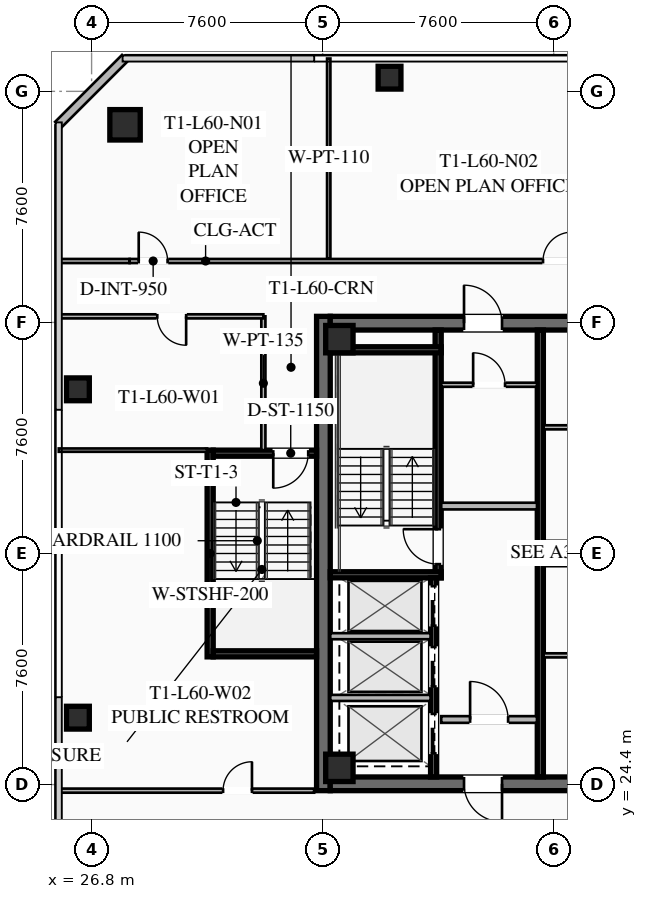
"""IFC4 building model, lengths in metres.
Left out: names, types, materials, properties, quantities, classifications, styles, units other than length and angle.
Written with IfcOpenShell. Run it as: python <this file> out.ifc"""

import sys

from ifc_helpers import new_model, si_unit, direction, frame, frame_2d, origin, origin_2d, place, context, subcontext, project, spatial, rectangle, hollow_rectangle, extrude, element, fill, save


model = new_model("IFC4")
c1 = context("Model", 3, precision=1e-05, world=origin(), true_north=direction((0.0, 1.0)))
c2 = subcontext(c1, "Body", "Model", "MODEL_VIEW")
j1 = project(units=[si_unit("LENGTHUNIT", "METRE"), si_unit("PLANEANGLEUNIT", "RADIAN")], contexts=[c1])
p1 = place(None, origin())
s1 = spatial("IfcSite", under=j1, at=p1, CompositionType="ELEMENT")
p2 = place(p1, origin())
s2 = spatial("IfcBuilding", under=s1, at=p2, CompositionType="ELEMENT")
p3 = place(p2, frame((0.0, 0.0, 221.95)))
s3 = spatial("IfcBuildingStorey", under=s2, at=p3, CompositionType="ELEMENT", Elevation=221.95)
p4 = place(p3, frame((34.425, 24.2, 0.0), z_axis=(0.0, 0.0, 1.0), x_axis=(0.0, 1.0, 0.0)))
e1 = element("IfcWall", 1, at=p4, inside=s3, PredefinedType="SHEAR", context=c2, shape_type="SweptSolid", body=[
    extrude(rectangle(XDim=15.6, YDim=0.45, at=frame_2d((7.8, 0.0))), origin(), (0.0, 0.0, 1.0), 3.55),
])
p5 = place(p3, frame((49.35, 24.425, 0.0), z_axis=(0.0, 0.0, 1.0), x_axis=(-1.0, 0.0, 0.0)))
e2 = element("IfcWall", 2, at=p5, inside=s3, PredefinedType="SHEAR", context=c2, shape_type="SweptSolid", body=[
    extrude(rectangle(XDim=14.7, YDim=0.45, at=frame_2d((7.35, 0.0))), origin(), (0.0, 0.0, 1.0), 3.55),
])
p6 = place(p5, frame((9.05, 0.0, 0.0)))
e3 = element("IfcOpeningElement", 3, at=p6, cuts=e2, PredefinedType="OPENING", context=c2, shape_type="SweptSolid", body=[
    extrude(rectangle(XDim=1.25, YDim=2.25, at=frame_2d((0.625, 1.125))), frame((0.0, 0.235, 0.0), z_axis=(0.0, -1.0, 0.0), x_axis=(1.0, 0.0, 0.0)), (0.0, 0.0, 1.0), 0.47),
])
p7 = place(p5, frame((4.0, 0.0, 0.0)))
e4 = element("IfcOpeningElement", 4, at=p7, cuts=e2, PredefinedType="OPENING", context=c2, shape_type="SweptSolid", body=[
    extrude(rectangle(XDim=1.25, YDim=2.25, at=frame_2d((0.625, 1.125))), frame((0.0, 0.235, 0.0), z_axis=(0.0, -1.0, 0.0), x_axis=(1.0, 0.0, 0.0)), (0.0, 0.0, 1.0), 0.47),
])
p8 = place(p3, frame((34.65, 39.575, 0.0), z_axis=(0.0, 0.0, 1.0), x_axis=(1.0, 0.0, 0.0)))
e5 = element("IfcWall", 5, at=p8, inside=s3, PredefinedType="SHEAR", context=c2, shape_type="SweptSolid", body=[
    extrude(rectangle(XDim=14.7, YDim=0.45, at=frame_2d((7.35, 0.0))), origin(), (0.0, 0.0, 1.0), 3.55),
])
p9 = place(p8, frame((4.4, 0.0, 0.0)))
e6 = element("IfcOpeningElement", 6, at=p9, cuts=e5, PredefinedType="OPENING", context=c2, shape_type="SweptSolid", body=[
    extrude(rectangle(XDim=1.25, YDim=2.25, at=frame_2d((0.625, 1.125))), frame((0.0, 0.235, 0.0), z_axis=(0.0, -1.0, 0.0), x_axis=(1.0, 0.0, 0.0)), (0.0, 0.0, 1.0), 0.47),
])
p10 = place(p8, frame((9.45, 0.0, 0.0)))
e7 = element("IfcOpeningElement", 7, at=p10, cuts=e5, PredefinedType="OPENING", context=c2, shape_type="SweptSolid", body=[
    extrude(rectangle(XDim=1.25, YDim=2.25, at=frame_2d((0.625, 1.125))), frame((0.0, 0.235, 0.0), z_axis=(0.0, -1.0, 0.0), x_axis=(1.0, 0.0, 0.0)), (0.0, 0.0, 1.0), 0.47),
])
for number, where, z_axis, x_axis in (
    (8, (34.95, 24.95, 0.0), (0.0, 0.0, 1.0), (1.0, 0.0, 0.0)),
    (9, (34.95, 39.05, 0.0), (0.0, 0.0, 1.0), (1.0, 0.0, 0.0)),
):
    element("IfcColumn", number, at=place(p3, frame(where, z_axis=z_axis, x_axis=x_axis)), inside=s3, PredefinedType="COLUMN", context=c2, shape_type="SweptSolid", body=[
        extrude(hollow_rectangle(XDim=0.9, YDim=0.9, WallThickness=0.04, at=origin_2d()), origin(), (0.0, 0.0, 1.0), 3.37),
    ])
p11 = place(p3, frame((27.9, 46.1, 0.0), z_axis=(0.0, 0.0, 1.0), x_axis=(1.0, 0.0, 0.0)))
e10 = element("IfcColumn", 10, at=p11, inside=s3, PredefinedType="COLUMN", context=c2, shape_type="SweptSolid", body=[
    extrude(hollow_rectangle(XDim=1.0, YDim=1.0, WallThickness=0.04, at=origin_2d()), origin(), (0.0, 0.0, 1.0), 3.37),
])
for number, where, z_axis, x_axis in (
    (11, (36.6, 47.65, 0.0), (0.0, 0.0, 1.0), (1.0, 0.0, 0.0)),
    (12, (26.35, 37.4, 0.0), (0.0, 0.0, 1.0), (1.0, 0.0, 0.0)),
    (13, (26.35, 26.6, 0.0), (0.0, 0.0, 1.0), (1.0, 0.0, 0.0)),
):
    element("IfcColumn", number, at=place(p3, frame(where, z_axis=z_axis, x_axis=x_axis)), inside=s3, PredefinedType="COLUMN", context=c2, shape_type="SweptSolid", body=[
        extrude(hollow_rectangle(XDim=0.75, YDim=0.75, WallThickness=0.032, at=origin_2d()), origin(), (0.0, 0.0, 1.0), 3.37),
    ])
p12 = place(p3, frame((25.7, 46.1, 0.0), z_axis=(0.0, 0.0, 1.0), x_axis=(0.707106781187, 0.707106781187, 0.0)))
e14 = element("IfcWall", 14, at=p12, inside=s3, PredefinedType="SOLIDWALL", context=c2, shape_type="SweptSolid", body=[
    extrude(rectangle(XDim=3.111, YDim=0.28, at=frame_2d((1.556, 0.0))), origin(), (0.0, 0.0, 1.0), 3.37),
])
p13 = place(p3, frame((38.2, 31.2, 0.0), z_axis=(0.0, 0.0, 1.0), x_axis=(0.0, 1.0, 0.0)))
e15 = element("IfcWall", 15, at=p13, inside=s3, PredefinedType="SHEAR", context=c2, shape_type="SweptSolid", body=[
    extrude(rectangle(XDim=8.15, YDim=0.2, at=frame_2d((4.075, 0.0))), origin(), (0.0, 0.0, 1.0), 3.37),
])
p14 = place(p13, frame((0.45, 0.0, 0.0)))
e16 = element("IfcOpeningElement", 16, at=p14, cuts=e15, PredefinedType="OPENING", context=c2, shape_type="SweptSolid", body=[
    extrude(rectangle(XDim=1.15, YDim=2.2, at=frame_2d((0.575, 1.1))), frame((0.0, 0.11, 0.0), z_axis=(0.0, -1.0, 0.0), x_axis=(1.0, 0.0, 0.0)), (0.0, 0.0, 1.0), 0.22),
])
for number, where, z_axis, x_axis in (
    (17, (34.65, 31.3, 0.0), (0.0, 0.0, 1.0), (1.0, 0.0, 0.0)),
    (18, (34.65, 38.7, 0.0), (0.0, 0.0, 1.0), (1.0, 0.0, 0.0)),
):
    element("IfcWall", number, at=place(p3, frame(where, z_axis=z_axis, x_axis=x_axis)), inside=s3, PredefinedType="SHEAR", context=c2, shape_type="SweptSolid", body=[
        extrude(rectangle(XDim=3.65, YDim=0.2, at=frame_2d((1.825, 0.0))), origin(), (0.0, 0.0, 1.0), 3.37),
    ])
p15 = place(p3, frame((41.56, 24.65, 0.0), z_axis=(0.0, 0.0, 1.0), x_axis=(0.0, 1.0, 0.0)))
e19 = element("IfcWall", 19, at=p15, inside=s3, PredefinedType="SHEAR", context=c2, shape_type="SweptSolid", body=[
    extrude(rectangle(XDim=14.7, YDim=0.2, at=frame_2d((7.35, 0.0))), origin(), (0.0, 0.0, 1.0), 3.37),
])
p16 = place(p3, frame((38.3, 33.56, 0.0), z_axis=(0.0, 0.0, 1.0), x_axis=(1.0, 0.0, 0.0)))
e20 = element("IfcWall", 20, at=p16, inside=s3, PredefinedType="SOLIDWALL", context=c2, shape_type="SweptSolid", body=[
    extrude(rectangle(XDim=3.15, YDim=0.22, at=frame_2d((1.575, 0.0))), origin(), (0.0, 0.0, 1.0), 2.723),
])
p17 = place(p3, frame((38.3, 26.54, 0.0), z_axis=(0.0, 0.0, 1.0), x_axis=(1.0, 0.0, 0.0)))
e21 = element("IfcWall", 21, at=p17, inside=s3, PredefinedType="SOLIDWALL", context=c2, shape_type="SweptSolid", body=[
    extrude(rectangle(XDim=3.15, YDim=0.22, at=frame_2d((1.575, 0.0))), origin(), (0.0, 0.0, 1.0), 2.723),
])
p18 = place(p17, frame((0.95, 0.0, 0.0)))
e22 = element("IfcOpeningElement", 22, at=p18, cuts=e21, PredefinedType="OPENING", context=c2, shape_type="SweptSolid", body=[
    extrude(rectangle(XDim=1.25, YDim=2.25, at=frame_2d((0.625, 1.125))), frame((0.0, 0.12, 0.0), z_axis=(0.0, -1.0, 0.0), x_axis=(1.0, 0.0, 0.0)), (0.0, 0.0, 1.0), 0.24),
])
p19 = place(p3, frame((38.05, 24.65, 0.0), z_axis=(0.0, 0.0, 1.0), x_axis=(0.0, 1.0, 0.0)))
e23 = element("IfcWall", 23, at=p19, inside=s3, PredefinedType="SHEAR", context=c2, shape_type="SweptSolid", body=[
    extrude(rectangle(XDim=6.55, YDim=0.2, at=frame_2d((3.275, 0.0))), origin(), (0.0, 0.0, 1.0), 3.37),
])
p20 = place(p19, frame((4.975, 0.0, 0.0)))
e24 = element("IfcOpeningElement", 24, at=p20, cuts=e23, PredefinedType="OPENING", context=c2, shape_type="SweptSolid", body=[
    extrude(rectangle(XDim=1.3, YDim=2.25, at=frame_2d((0.65, 1.125))), frame((0.0, 0.11, 0.0), z_axis=(0.0, -1.0, 0.0), x_axis=(1.0, 0.0, 0.0)), (0.0, 0.0, 1.0), 0.22),
])
p21 = place(p19, frame((2.975, 0.0, 0.0)))
e25 = element("IfcOpeningElement", 25, at=p21, cuts=e23, PredefinedType="OPENING", context=c2, shape_type="SweptSolid", body=[
    extrude(rectangle(XDim=1.3, YDim=2.25, at=frame_2d((0.65, 1.125))), frame((0.0, 0.11, 0.0), z_axis=(0.0, -1.0, 0.0), x_axis=(1.0, 0.0, 0.0)), (0.0, 0.0, 1.0), 0.22),
])
p22 = place(p19, frame((0.775, 0.0, 0.0)))
e26 = element("IfcOpeningElement", 26, at=p22, cuts=e23, PredefinedType="OPENING", context=c2, shape_type="SweptSolid", body=[
    extrude(rectangle(XDim=1.3, YDim=2.25, at=frame_2d((0.65, 1.125))), frame((0.0, 0.11, 0.0), z_axis=(0.0, -1.0, 0.0), x_axis=(1.0, 0.0, 0.0)), (0.0, 0.0, 1.0), 0.22),
])
for number, where, z_axis, x_axis in (
    (27, (34.65, 27.25, 0.0), (0.0, 0.0, 1.0), (1.0, 0.0, 0.0)),
    (28, (34.65, 29.28, 0.0), (0.0, 0.0, 1.0), (1.0, 0.0, 0.0)),
):
    element("IfcWall", number, at=place(p3, frame(where, z_axis=z_axis, x_axis=x_axis)), inside=s3, PredefinedType="SOLIDWALL", context=c2, shape_type="SweptSolid", body=[
        extrude(rectangle(XDim=3.3, YDim=0.2, at=frame_2d((1.65, 0.0))), origin(), (0.0, 0.0, 1.0), 3.37),
    ])
p23 = place(p3, frame((38.3, 37.55, 0.0), z_axis=(0.0, 0.0, 1.0), x_axis=(1.0, 0.0, 0.0)))
e29 = element("IfcWall", 29, at=p23, inside=s3, PredefinedType="PARTITIONING", context=c2, shape_type="SweptSolid", body=[
    extrude(rectangle(XDim=3.15, YDim=0.135, at=frame_2d((1.575, 0.0))), origin(), (0.0, 0.0, 1.0), 2.723),
])
p24 = place(p23, frame((1.05, 0.0, 0.0)))
e30 = element("IfcOpeningElement", 30, at=p24, cuts=e29, PredefinedType="OPENING", context=c2, shape_type="SweptSolid", body=[
    extrude(rectangle(XDim=1.05, YDim=2.2, at=frame_2d((0.525, 1.1))), frame((0.0, 0.077, 0.0), z_axis=(0.0, -1.0, 0.0), x_axis=(1.0, 0.0, 0.0)), (0.0, 0.0, 1.0), 0.155),
])
for number, where, z_axis, x_axis in (
    (31, (41.67, 31.65, 0.0), (0.0, 0.0, 1.0), (1.0, 0.0, 0.0)),
    (32, (41.67, 28.65, 0.0), (0.0, 0.0, 1.0), (1.0, 0.0, 0.0)),
    (33, (41.67, 32.35, 0.0), (0.0, 0.0, 1.0), (1.0, 0.0, 0.0)),
    (34, (41.67, 36.15, 0.0), (0.0, 0.0, 1.0), (1.0, 0.0, 0.0)),
):
    element("IfcWall", number, at=place(p3, frame(where, z_axis=z_axis, x_axis=x_axis)), inside=s3, PredefinedType="PARTITIONING", context=c2, shape_type="SweptSolid", body=[
        extrude(rectangle(XDim=1.88, YDim=0.135, at=frame_2d((0.94, 0.0))), origin(), (0.0, 0.0, 1.0), 2.723),
    ])
p25 = place(p3, frame((30.7, 28.6, 0.0), z_axis=(0.0, 0.0, 1.0), x_axis=(0.0, 1.0, 0.0)))
e35 = element("IfcWall", 35, at=p25, inside=s3, PredefinedType="SHEAR", context=c2, shape_type="SweptSolid", body=[
    extrude(rectangle(XDim=6.8, YDim=0.2, at=frame_2d((3.4, 0.0))), origin(), (0.0, 0.0, 1.0), 3.37),
])
p26 = place(p3, frame((34.2, 35.3, 0.0), z_axis=(0.0, 0.0, 1.0), x_axis=(-1.0, 0.0, 0.0)))
e36 = element("IfcWall", 36, at=p26, inside=s3, PredefinedType="SHEAR", context=c2, shape_type="SweptSolid", body=[
    extrude(rectangle(XDim=3.4, YDim=0.2, at=frame_2d((1.7, 0.0))), origin(), (0.0, 0.0, 1.0), 3.37),
])
p27 = place(p26, frame((0.275, 0.0, 0.0)))
e37 = element("IfcOpeningElement", 37, at=p27, cuts=e36, PredefinedType="OPENING", context=c2, shape_type="SweptSolid", body=[
    extrude(rectangle(XDim=1.15, YDim=2.2, at=frame_2d((0.575, 1.1))), frame((0.0, 0.11, 0.0), z_axis=(0.0, -1.0, 0.0), x_axis=(1.0, 0.0, 0.0)), (0.0, 0.0, 1.0), 0.22),
])
p28 = place(p3, frame((30.8, 28.7, 0.0), z_axis=(0.0, 0.0, 1.0), x_axis=(1.0, 0.0, 0.0)))
e38 = element("IfcWall", 38, at=p28, inside=s3, PredefinedType="SHEAR", context=c2, shape_type="SweptSolid", body=[
    extrude(rectangle(XDim=3.4, YDim=0.2, at=frame_2d((1.7, 0.0))), origin(), (0.0, 0.0, 1.0), 3.37),
])
p29 = place(p3, frame((32.45, 35.4, 0.0), z_axis=(0.0, 0.0, 1.0), x_axis=(0.0, 1.0, 0.0)))
e39 = element("IfcWall", 39, at=p29, inside=s3, PredefinedType="PARTITIONING", context=c2, shape_type="SweptSolid", body=[
    extrude(rectangle(XDim=4.4, YDim=0.135, at=frame_2d((2.2, 0.0))), origin(), (0.0, 0.0, 1.0), 2.723),
])
p30 = place(p3, frame((28.05, 41.62, 0.0), z_axis=(0.0, 0.0, 1.0), x_axis=(1.0, 0.0, 0.0)))
e40 = element("IfcWall", 40, at=p30, inside=s3, PredefinedType="PARTITIONING", context=c2, shape_type="SweptSolid", body=[
    extrude(rectangle(XDim=27.9, YDim=0.135, at=frame_2d((13.95, 0.0))), origin(), (0.0, 0.0, 1.0), 2.723),
])
p31 = place(p30, frame((0.3, 0.0, 0.0)))
e41 = element("IfcOpeningElement", 41, at=p31, cuts=e40, PredefinedType="OPENING", context=c2, shape_type="SweptSolid", body=[
    extrude(rectangle(XDim=0.95, YDim=2.05, at=frame_2d((0.475, 1.025))), frame((0.0, 0.077, 0.0), z_axis=(0.0, -1.0, 0.0), x_axis=(1.0, 0.0, 0.0)), (0.0, 0.0, 1.0), 0.155),
])
p32 = place(p30, frame((13.599, 0.0, 0.0)))
e42 = element("IfcOpeningElement", 42, at=p32, cuts=e40, PredefinedType="OPENING", context=c2, shape_type="SweptSolid", body=[
    extrude(rectangle(XDim=0.95, YDim=2.05, at=frame_2d((0.475, 1.025))), frame((0.0, 0.077, 0.0), z_axis=(0.0, -1.0, 0.0), x_axis=(1.0, 0.0, 0.0)), (0.0, 0.0, 1.0), 0.155),
])
p33 = place(p30, frame((26.65, 0.0, 0.0)))
e43 = element("IfcOpeningElement", 43, at=p33, cuts=e40, PredefinedType="OPENING", context=c2, shape_type="SweptSolid", body=[
    extrude(rectangle(XDim=0.95, YDim=2.05, at=frame_2d((0.475, 1.025))), frame((0.0, 0.077, 0.0), z_axis=(0.0, -1.0, 0.0), x_axis=(1.0, 0.0, 0.0)), (0.0, 0.0, 1.0), 0.155),
])
p34 = place(p3, frame((25.72, 41.62, 0.0), z_axis=(0.0, 0.0, 1.0), x_axis=(1.0, 0.0, 0.0)))
e44 = element("IfcWall", 44, at=p34, inside=s3, PredefinedType="PARTITIONING", context=c2, shape_type="SweptSolid", body=[
    extrude(rectangle(XDim=2.33, YDim=0.135, at=frame_2d((1.165, 0.0))), origin(), (0.0, 0.0, 1.0), 2.723),
])
p35 = place(p3, frame((34.6, 41.7, 0.0), z_axis=(0.0, 0.0, 1.0), x_axis=(0.0, 1.0, 0.0)))
e45 = element("IfcWall", 45, at=p35, inside=s3, PredefinedType="PARTITIONING", context=c2, shape_type="SweptSolid", body=[
    extrude(rectangle(XDim=6.58, YDim=0.11, at=frame_2d((3.29, 0.0))), origin(), (0.0, 0.0, 1.0), 2.723),
])
p36 = place(p3, frame((32.45, 39.8, 0.0), z_axis=(0.0, 0.0, 1.0), x_axis=(-1.0, 0.0, 0.0)))
e46 = element("IfcWall", 46, at=p36, inside=s3, PredefinedType="PARTITIONING", context=c2, shape_type="SweptSolid", body=[
    extrude(rectangle(XDim=6.73, YDim=0.135, at=frame_2d((3.365, 0.0))), origin(), (0.0, 0.0, 1.0), 2.723),
])
p37 = place(p36, frame((2.54, 0.0, 0.0)))
e47 = element("IfcOpeningElement", 47, at=p37, cuts=e46, PredefinedType="OPENING", context=c2, shape_type="SweptSolid", body=[
    extrude(rectangle(XDim=0.95, YDim=2.05, at=frame_2d((0.475, 1.025))), frame((0.0, 0.077, 0.0), z_axis=(0.0, -1.0, 0.0), x_axis=(1.0, 0.0, 0.0)), (0.0, 0.0, 1.0), 0.155),
])
p38 = place(p3, frame((25.72, 24.2, 0.0), z_axis=(0.0, 0.0, 1.0), x_axis=(1.0, 0.0, 0.0)))
e48 = element("IfcWall", 48, at=p38, inside=s3, PredefinedType="PARTITIONING", context=c2, shape_type="SweptSolid", body=[
    extrude(rectangle(XDim=8.4, YDim=0.135, at=frame_2d((4.2, 0.0))), origin(), (0.0, 0.0, 1.0), 2.723),
])
p39 = place(p38, frame((5.405, 0.0, 0.0)))
e49 = element("IfcOpeningElement", 49, at=p39, cuts=e48, PredefinedType="OPENING", context=c2, shape_type="SweptSolid", body=[
    extrude(rectangle(XDim=0.95, YDim=2.05, at=frame_2d((0.475, 1.025))), frame((0.0, 0.077, 0.0), z_axis=(0.0, -1.0, 0.0), x_axis=(1.0, 0.0, 0.0)), (0.0, 0.0, 1.0), 0.155),
])
p40 = place(p3, frame((30.6, 35.4, 0.0), z_axis=(0.0, 0.0, 1.0), x_axis=(-1.0, 0.0, 0.0)))
e50 = element("IfcWall", 50, at=p40, inside=s3, PredefinedType="PARTITIONING", context=c2, shape_type="SweptSolid", body=[
    extrude(rectangle(XDim=4.88, YDim=0.11, at=frame_2d((2.44, 0.0))), origin(), (0.0, 0.0, 1.0), 2.723),
])
p41 = place(p9, origin())
e51 = element("IfcDoor", 51, at=p41, inside=s3, OperationType="SINGLE_SWING_LEFT", PredefinedType="DOOR", context=c2, shape_type="SweptSolid", body=[
    extrude(rectangle(XDim=1.25, YDim=2.25, at=frame_2d((0.625, 1.125))), frame((0.0, 0.025, 0.0), z_axis=(0.0, -1.0, 0.0), x_axis=(1.0, 0.0, 0.0)), (0.0, 0.0, 1.0), 0.05),
])
fill(e6, e51)
p42 = place(p6, origin())
e52 = element("IfcDoor", 52, at=p42, inside=s3, OperationType="SINGLE_SWING_LEFT", PredefinedType="DOOR", context=c2, shape_type="SweptSolid", body=[
    extrude(rectangle(XDim=1.25, YDim=2.25, at=frame_2d((0.625, 1.125))), frame((0.0, 0.025, 0.0), z_axis=(0.0, -1.0, 0.0), x_axis=(1.0, 0.0, 0.0)), (0.0, 0.0, 1.0), 0.05),
])
fill(e3, e52)
p43 = place(p14, origin())
e53 = element("IfcDoor", 53, at=p43, inside=s3, OperationType="SINGLE_SWING_RIGHT", PredefinedType="DOOR", context=c2, shape_type="SweptSolid", body=[
    extrude(rectangle(XDim=1.15, YDim=2.2, at=frame_2d((0.575, 1.1))), frame((0.0, 0.025, 0.0), z_axis=(0.0, -1.0, 0.0), x_axis=(1.0, 0.0, 0.0)), (0.0, 0.0, 1.0), 0.05),
])
fill(e16, e53)
p44 = place(p18, origin())
e54 = element("IfcDoor", 54, at=p44, inside=s3, OperationType="SINGLE_SWING_LEFT", PredefinedType="DOOR", context=c2, shape_type="SweptSolid", body=[
    extrude(rectangle(XDim=1.25, YDim=2.25, at=frame_2d((0.625, 1.125))), frame((0.0, 0.025, 0.0), z_axis=(0.0, -1.0, 0.0), x_axis=(1.0, 0.0, 0.0)), (0.0, 0.0, 1.0), 0.05),
])
fill(e22, e54)
p45 = place(p24, origin())
e55 = element("IfcDoor", 55, at=p45, inside=s3, OperationType="SINGLE_SWING_LEFT", PredefinedType="DOOR", context=c2, shape_type="SweptSolid", body=[
    extrude(rectangle(XDim=1.05, YDim=2.2, at=frame_2d((0.525, 1.1))), frame((0.0, 0.025, 0.0), z_axis=(0.0, -1.0, 0.0), x_axis=(1.0, 0.0, 0.0)), (0.0, 0.0, 1.0), 0.05),
])
fill(e30, e55)
p46 = place(p27, origin())
e56 = element("IfcDoor", 56, at=p46, inside=s3, OperationType="SINGLE_SWING_RIGHT", PredefinedType="DOOR", context=c2, shape_type="SweptSolid", body=[
    extrude(rectangle(XDim=1.15, YDim=2.2, at=frame_2d((0.575, 1.1))), frame((0.0, 0.025, 0.0), z_axis=(0.0, -1.0, 0.0), x_axis=(1.0, 0.0, 0.0)), (0.0, 0.0, 1.0), 0.05),
])
fill(e37, e56)
p47 = place(p31, origin())
e57 = element("IfcDoor", 57, at=p47, inside=s3, OperationType="SINGLE_SWING_LEFT", PredefinedType="DOOR", context=c2, shape_type="SweptSolid", body=[
    extrude(rectangle(XDim=0.95, YDim=2.05, at=frame_2d((0.475, 1.025))), frame((0.0, 0.025, 0.0), z_axis=(0.0, -1.0, 0.0), x_axis=(1.0, 0.0, 0.0)), (0.0, 0.0, 1.0), 0.05),
])
fill(e41, e57)
p48 = place(p32, origin())
e58 = element("IfcDoor", 58, at=p48, inside=s3, OperationType="SINGLE_SWING_RIGHT", PredefinedType="DOOR", context=c2, shape_type="SweptSolid", body=[
    extrude(rectangle(XDim=0.95, YDim=2.05, at=frame_2d((0.475, 1.025))), frame((0.0, 0.025, 0.0), z_axis=(0.0, -1.0, 0.0), x_axis=(1.0, 0.0, 0.0)), (0.0, 0.0, 1.0), 0.05),
])
fill(e42, e58)
p49 = place(p37, origin())
e59 = element("IfcDoor", 59, at=p49, inside=s3, OperationType="SINGLE_SWING_LEFT", PredefinedType="DOOR", context=c2, shape_type="SweptSolid", body=[
    extrude(rectangle(XDim=0.95, YDim=2.05, at=frame_2d((0.475, 1.025))), frame((0.0, 0.025, 0.0), z_axis=(0.0, -1.0, 0.0), x_axis=(1.0, 0.0, 0.0)), (0.0, 0.0, 1.0), 0.05),
])
fill(e47, e59)
p50 = place(p39, origin())
e60 = element("IfcDoor", 60, at=p50, inside=s3, OperationType="SINGLE_SWING_RIGHT", PredefinedType="DOOR", context=c2, shape_type="SweptSolid", body=[
    extrude(rectangle(XDim=0.95, YDim=2.05, at=frame_2d((0.475, 1.025))), frame((0.0, 0.025, 0.0), z_axis=(0.0, -1.0, 0.0), x_axis=(1.0, 0.0, 0.0)), (0.0, 0.0, 1.0), 0.05),
])
fill(e49, e60)
p51 = place(p20, origin())
e61 = element("IfcDoor", 61, at=p51, inside=s3, OperationType="SLIDING_TO_LEFT", PredefinedType="DOOR", context=c2, shape_type="SweptSolid", body=[
    extrude(rectangle(XDim=1.3, YDim=2.25, at=frame_2d((0.65, 1.125))), frame((0.0, 0.025, 0.0), z_axis=(0.0, -1.0, 0.0), x_axis=(1.0, 0.0, 0.0)), (0.0, 0.0, 1.0), 0.05),
])
fill(e24, e61)
p52 = place(p21, origin())
e62 = element("IfcDoor", 62, at=p52, inside=s3, OperationType="SLIDING_TO_LEFT", PredefinedType="DOOR", context=c2, shape_type="SweptSolid", body=[
    extrude(rectangle(XDim=1.3, YDim=2.25, at=frame_2d((0.65, 1.125))), frame((0.0, 0.025, 0.0), z_axis=(0.0, -1.0, 0.0), x_axis=(1.0, 0.0, 0.0)), (0.0, 0.0, 1.0), 0.05),
])
fill(e25, e62)
p53 = place(p22, origin())
e63 = element("IfcDoor", 63, at=p53, inside=s3, OperationType="SLIDING_TO_LEFT", PredefinedType="DOOR", context=c2, shape_type="SweptSolid", body=[
    extrude(rectangle(XDim=1.3, YDim=2.25, at=frame_2d((0.65, 1.125))), frame((0.0, 0.025, 0.0), z_axis=(0.0, -1.0, 0.0), x_axis=(1.0, 0.0, 0.0)), (0.0, 0.0, 1.0), 0.05),
])
fill(e26, e63)
save(model, sys.argv[1])
